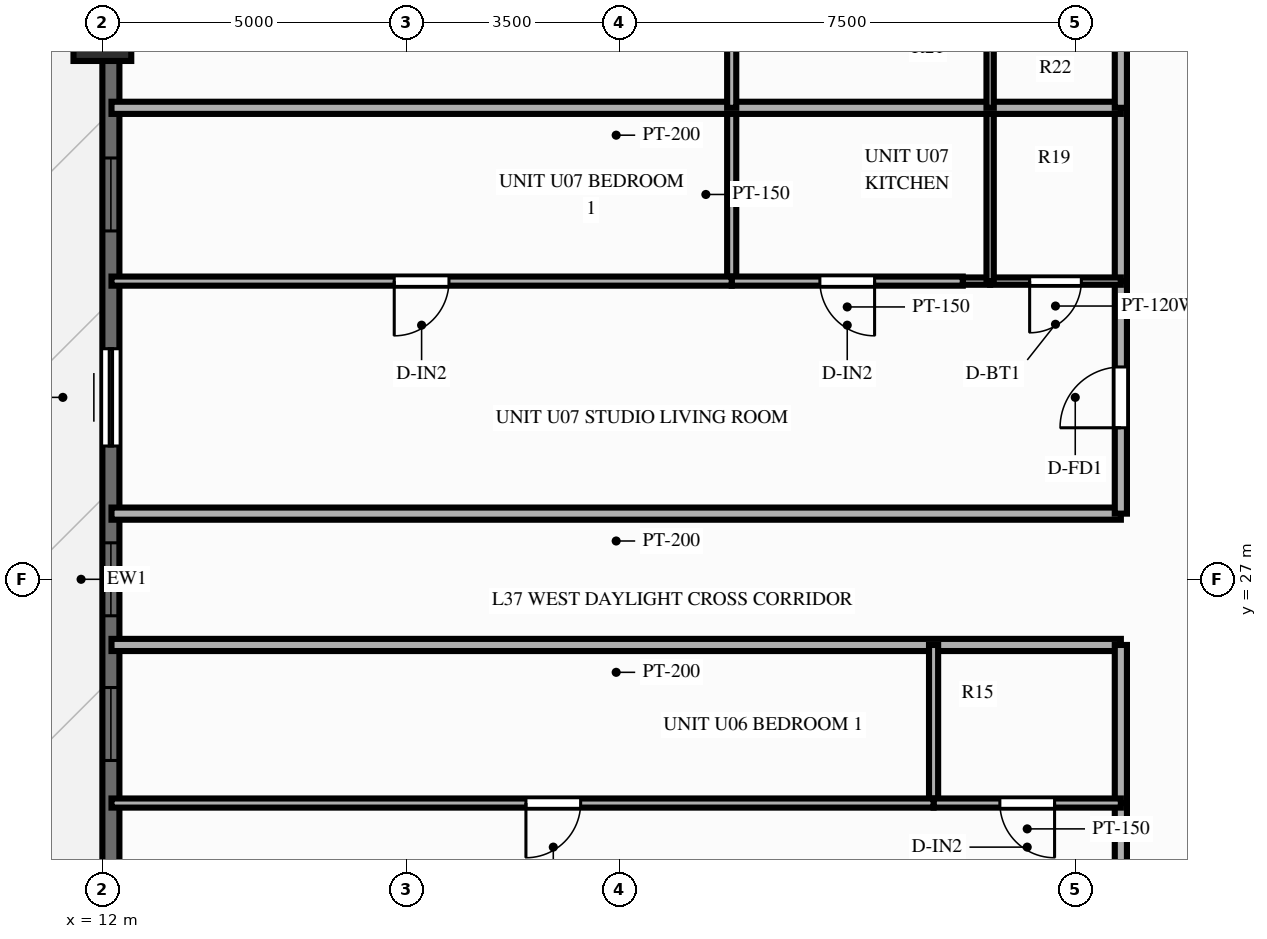
"""IFC4 building model, lengths in metres.
Left out: names, types, materials, properties, quantities, classifications, styles, units other than length and angle.
Written with IfcOpenShell. Run it as: python <this file> out.ifc"""

import sys

from ifc_helpers import new_model, si_unit, direction, frame, frame_2d, origin, origin_2d, place, context, subcontext, project, spatial, rectangle, extrude, source, transform, mapped, element, fill, save


model = new_model("IFC4")
c1 = context("Model", 3, precision=1e-05, world=origin(), true_north=direction((0.0, 1.0)))
c2 = subcontext(c1, "Body", "Model", "MODEL_VIEW")
j1 = project(units=[si_unit("LENGTHUNIT", "METRE"), si_unit("PLANEANGLEUNIT", "RADIAN")], contexts=[c1])
p1 = place(None, origin())
s1 = spatial("IfcSite", under=j1, at=p1, CompositionType="ELEMENT")
p2 = place(p1, origin())
s2 = spatial("IfcBuilding", under=s1, at=p2, CompositionType="ELEMENT")
p3 = place(p2, frame((0.0, 0.0, 116.85)))
s3 = spatial("IfcBuildingStorey", under=s2, at=p3, CompositionType="ELEMENT", Elevation=116.85)
m1 = source(origin(), c2, "Body", "SweptSolid", [
    extrude(rectangle(XDim=0.95, YDim=0.95, at=origin_2d()), origin(), (0.0, 0.0, 1.0), 3.0),
])
p4 = place(p3, frame((12.0, 36.0, 0.0), z_axis=(0.0, 0.0, 1.0), x_axis=(1.0, 0.0, 0.0)))
e1 = element("IfcColumn", 1, at=p4, inside=s3, PredefinedType="COLUMN", context=c2, shape_type="MappedRepresentation", body=[
    mapped(m1, transform((0.0, 0.0, 0.0), scale=1.0)),
])
p5 = place(p3, frame((12.14, 7.2, 0.0), z_axis=(0.0, 0.0, 1.0), x_axis=(0.0, 1.0, 0.0)))
e2 = element("IfcWall", 2, at=p5, inside=s3, PredefinedType="SOLIDWALL", context=c2, shape_type="SweptSolid", body=[
    extrude(rectangle(XDim=39.6, YDim=0.28, at=frame_2d((19.8, 0.0))), origin(), (0.0, 0.0, 1.0), 2.28),
])
p6 = place(p5, frame((0.945, 0.0, 0.25)))
e3 = element("IfcOpeningElement", 3, at=p6, cuts=e2, PredefinedType="OPENING", context=c2, shape_type="SweptSolid", body=[
    extrude(rectangle(XDim=1.2, YDim=1.5, at=frame_2d((0.6, 0.75))), frame((0.0, 0.152, 0.0), z_axis=(0.0, -1.0, 0.0), x_axis=(1.0, 0.0, 0.0)), (0.0, 0.0, 1.0), 0.304),
])
p7 = place(p5, frame((4.213, 0.0, 0.25)))
e4 = element("IfcOpeningElement", 4, at=p7, cuts=e2, PredefinedType="OPENING", context=c2, shape_type="SweptSolid", body=[
    extrude(rectangle(XDim=1.2, YDim=1.5, at=frame_2d((0.6, 0.75))), frame((0.0, 0.152, 0.0), z_axis=(0.0, -1.0, 0.0), x_axis=(1.0, 0.0, 0.0)), (0.0, 0.0, 1.0), 0.304),
])
p8 = place(p5, frame((7.55, 0.0, 0.25)))
e5 = element("IfcOpeningElement", 5, at=p8, cuts=e2, PredefinedType="OPENING", context=c2, shape_type="SweptSolid", body=[
    extrude(rectangle(XDim=1.2, YDim=1.5, at=frame_2d((0.6, 0.75))), frame((0.0, 0.152, 0.0), z_axis=(0.0, -1.0, 0.0), x_axis=(1.0, 0.0, 0.0)), (0.0, 0.0, 1.0), 0.304),
])
p9 = place(p5, frame((13.483, 0.0, 0.25)))
e6 = element("IfcOpeningElement", 6, at=p9, cuts=e2, PredefinedType="OPENING", context=c2, shape_type="SweptSolid", body=[
    extrude(rectangle(XDim=1.2, YDim=1.5, at=frame_2d((0.6, 0.75))), frame((0.0, 0.152, 0.0), z_axis=(0.0, -1.0, 0.0), x_axis=(1.0, 0.0, 0.0)), (0.0, 0.0, 1.0), 0.304),
])
p10 = place(p5, frame((16.82, 0.0, 0.25)))
e7 = element("IfcOpeningElement", 7, at=p10, cuts=e2, PredefinedType="OPENING", context=c2, shape_type="SweptSolid", body=[
    extrude(rectangle(XDim=1.2, YDim=1.5, at=frame_2d((0.6, 0.75))), frame((0.0, 0.152, 0.0), z_axis=(0.0, -1.0, 0.0), x_axis=(1.0, 0.0, 0.0)), (0.0, 0.0, 1.0), 0.304),
])
p11 = place(p5, frame((19.2, 0.0, 0.25)))
e8 = element("IfcOpeningElement", 8, at=p11, cuts=e2, PredefinedType="OPENING", context=c2, shape_type="SweptSolid", body=[
    extrude(rectangle(XDim=1.2, YDim=1.5, at=frame_2d((0.6, 0.75))), frame((0.0, 0.152, 0.0), z_axis=(0.0, -1.0, 0.0), x_axis=(1.0, 0.0, 0.0)), (0.0, 0.0, 1.0), 0.304),
])
p12 = place(p5, frame((21.992, 0.0, 0.0)))
e9 = element("IfcOpeningElement", 9, at=p12, cuts=e2, PredefinedType="OPENING", context=c2, shape_type="SweptSolid", body=[
    extrude(rectangle(XDim=1.6, YDim=2.15, at=frame_2d((0.8, 1.075))), frame((0.0, 0.152, 0.0), z_axis=(0.0, -1.0, 0.0), x_axis=(1.0, 0.0, 0.0)), (0.0, 0.0, 1.0), 0.304),
])
p13 = place(p5, frame((25.529, 0.0, 0.25)))
e10 = element("IfcOpeningElement", 10, at=p13, cuts=e2, PredefinedType="OPENING", context=c2, shape_type="SweptSolid", body=[
    extrude(rectangle(XDim=1.2, YDim=1.5, at=frame_2d((0.6, 0.75))), frame((0.0, 0.152, 0.0), z_axis=(0.0, -1.0, 0.0), x_axis=(1.0, 0.0, 0.0)), (0.0, 0.0, 1.0), 0.304),
])
p14 = place(p5, frame((29.349, 0.0, 0.25)))
e11 = element("IfcOpeningElement", 11, at=p14, cuts=e2, PredefinedType="OPENING", context=c2, shape_type="SweptSolid", body=[
    extrude(rectangle(XDim=0.7, YDim=1.5, at=frame_2d((0.35, 0.75))), frame((0.0, 0.152, 0.0), z_axis=(0.0, -1.0, 0.0), x_axis=(1.0, 0.0, 0.0)), (0.0, 0.0, 1.0), 0.304),
])
p15 = place(p5, frame((31.285, 0.0, 0.25)))
e12 = element("IfcOpeningElement", 12, at=p15, cuts=e2, PredefinedType="OPENING", context=c2, shape_type="SweptSolid", body=[
    extrude(rectangle(XDim=1.2, YDim=1.5, at=frame_2d((0.6, 0.75))), frame((0.0, 0.152, 0.0), z_axis=(0.0, -1.0, 0.0), x_axis=(1.0, 0.0, 0.0)), (0.0, 0.0, 1.0), 0.304),
])
p16 = place(p5, frame((34.252, 0.0, 0.25)))
e13 = element("IfcOpeningElement", 13, at=p16, cuts=e2, PredefinedType="OPENING", context=c2, shape_type="SweptSolid", body=[
    extrude(rectangle(XDim=1.2, YDim=1.5, at=frame_2d((0.6, 0.75))), frame((0.0, 0.152, 0.0), z_axis=(0.0, -1.0, 0.0), x_axis=(1.0, 0.0, 0.0)), (0.0, 0.0, 1.0), 0.304),
])
p17 = place(p5, frame((37.151, 0.0, 0.25)))
e14 = element("IfcOpeningElement", 14, at=p17, cuts=e2, PredefinedType="OPENING", context=c2, shape_type="SweptSolid", body=[
    extrude(rectangle(XDim=1.2, YDim=1.5, at=frame_2d((0.6, 0.75))), frame((0.0, 0.152, 0.0), z_axis=(0.0, -1.0, 0.0), x_axis=(1.0, 0.0, 0.0)), (0.0, 0.0, 1.0), 0.304),
])
p18 = place(p3, frame((28.75, 25.92, 0.0), z_axis=(0.0, 0.0, 1.0), x_axis=(-1.0, 0.0, 0.0)))
e15 = element("IfcWall", 15, at=p18, inside=s3, PredefinedType="PARTITIONING", context=c2, shape_type="SweptSolid", body=[
    extrude(rectangle(XDim=16.6, YDim=0.2, at=frame_2d((8.3, 0.0))), origin(), (0.0, 0.0, 1.0), 2.79),
])
p19 = place(p3, frame((28.75, 19.246, 0.0), z_axis=(0.0, 0.0, 1.0), x_axis=(0.0, 1.0, 0.0)))
e16 = element("IfcWall", 16, at=p19, inside=s3, PredefinedType="PARTITIONING", context=c2, shape_type="SweptSolid", body=[
    extrude(rectangle(XDim=4.074, YDim=0.2, at=frame_2d((2.037, 0.0))), origin(), (0.0, 0.0, 1.0), 2.79),
])
p20 = place(p19, frame((1.537, 0.0, 0.0)))
e17 = element("IfcOpeningElement", 17, at=p20, cuts=e16, PredefinedType="OPENING", context=c2, shape_type="SweptSolid", body=[
    extrude(rectangle(XDim=1.0, YDim=2.15, at=frame_2d((0.5, 1.075))), frame((0.0, 0.112, 0.0), z_axis=(0.0, -1.0, 0.0), x_axis=(1.0, 0.0, 0.0)), (0.0, 0.0, 1.0), 0.224),
])
p21 = place(p3, frame((28.75, 23.32, 0.0), z_axis=(0.0, 0.0, 1.0), x_axis=(0.0, 1.0, 0.0)))
e18 = element("IfcWall", 18, at=p21, inside=s3, PredefinedType="PARTITIONING", context=c2, shape_type="SweptSolid", body=[
    extrude(rectangle(XDim=2.6, YDim=0.2, at=frame_2d((1.3, 0.0))), origin(), (0.0, 0.0, 1.0), 2.79),
])
p22 = place(p3, frame((25.67, 23.32, 0.0), z_axis=(0.0, 0.0, 1.0), x_axis=(0.0, 1.0, 0.0)))
e19 = element("IfcWall", 19, at=p22, inside=s3, PredefinedType="PARTITIONING", context=c2, shape_type="SweptSolid", body=[
    extrude(rectangle(XDim=2.6, YDim=0.15, at=frame_2d((1.3, 0.0))), origin(), (0.0, 0.0, 1.0), 2.79),
])
p23 = place(p3, frame((28.75, 23.32, 0.0), z_axis=(0.0, 0.0, 1.0), x_axis=(-1.0, 0.0, 0.0)))
e20 = element("IfcWall", 20, at=p23, inside=s3, PredefinedType="PARTITIONING", context=c2, shape_type="SweptSolid", body=[
    extrude(rectangle(XDim=3.08, YDim=0.15, at=frame_2d((1.54, 0.0))), origin(), (0.0, 0.0, 1.0), 2.79),
])
p24 = place(p23, frame((1.09, 0.0, 0.0)))
e21 = element("IfcOpeningElement", 21, at=p24, cuts=e20, PredefinedType="OPENING", context=c2, shape_type="SweptSolid", body=[
    extrude(rectangle(XDim=0.9, YDim=2.1, at=frame_2d((0.45, 1.05))), frame((0.0, 0.087, 0.0), z_axis=(0.0, -1.0, 0.0), x_axis=(1.0, 0.0, 0.0)), (0.0, 0.0, 1.0), 0.174),
])
p25 = place(p3, frame((25.67, 23.32, 0.0), z_axis=(0.0, 0.0, 1.0), x_axis=(-1.0, 0.0, 0.0)))
e22 = element("IfcWall", 22, at=p25, inside=s3, PredefinedType="PARTITIONING", context=c2, shape_type="SweptSolid", body=[
    extrude(rectangle(XDim=13.52, YDim=0.15, at=frame_2d((6.76, 0.0))), origin(), (0.0, 0.0, 1.0), 2.79),
])
p26 = place(p25, frame((5.804, 0.0, 0.0)))
e23 = element("IfcOpeningElement", 23, at=p26, cuts=e22, PredefinedType="OPENING", context=c2, shape_type="SweptSolid", body=[
    extrude(rectangle(XDim=0.9, YDim=2.1, at=frame_2d((0.45, 1.05))), frame((0.0, 0.087, 0.0), z_axis=(0.0, -1.0, 0.0), x_axis=(1.0, 0.0, 0.0)), (0.0, 0.0, 1.0), 0.174),
])
p27 = place(p3, frame((28.75, 28.08, 0.0), z_axis=(0.0, 0.0, 1.0), x_axis=(-1.0, 0.0, 0.0)))
e24 = element("IfcWall", 24, at=p27, inside=s3, PredefinedType="PARTITIONING", context=c2, shape_type="SweptSolid", body=[
    extrude(rectangle(XDim=16.6, YDim=0.2, at=frame_2d((8.3, 0.0))), origin(), (0.0, 0.0, 1.0), 2.79),
])
p28 = place(p3, frame((28.75, 28.08, 0.0), z_axis=(0.0, 0.0, 1.0), x_axis=(0.0, 1.0, 0.0)))
e25 = element("IfcWall", 25, at=p28, inside=s3, PredefinedType="PARTITIONING", context=c2, shape_type="SweptSolid", body=[
    extrude(rectangle(XDim=3.824, YDim=0.2, at=frame_2d((1.912, 0.0))), origin(), (0.0, 0.0, 1.0), 2.79),
])
p29 = place(p28, frame((1.412, 0.0, 0.0)))
e26 = element("IfcOpeningElement", 26, at=p29, cuts=e25, PredefinedType="OPENING", context=c2, shape_type="SweptSolid", body=[
    extrude(rectangle(XDim=1.0, YDim=2.15, at=frame_2d((0.5, 1.075))), frame((0.0, 0.112, 0.0), z_axis=(0.0, -1.0, 0.0), x_axis=(1.0, 0.0, 0.0)), (0.0, 0.0, 1.0), 0.224),
])
p30 = place(p3, frame((28.75, 31.904, 0.0), z_axis=(0.0, 0.0, 1.0), x_axis=(0.0, 1.0, 0.0)))
e27 = element("IfcWall", 27, at=p30, inside=s3, PredefinedType="PARTITIONING", context=c2, shape_type="SweptSolid", body=[
    extrude(rectangle(XDim=2.85, YDim=0.2, at=frame_2d((1.425, 0.0))), origin(), (0.0, 0.0, 1.0), 2.79),
])
p31 = place(p3, frame((28.75, 31.904, 0.0), z_axis=(0.0, 0.0, 1.0), x_axis=(-1.0, 0.0, 0.0)))
e28 = element("IfcWall", 28, at=p31, inside=s3, PredefinedType="PARTITIONING", context=c2, shape_type="SweptSolid", body=[
    extrude(rectangle(XDim=2.15, YDim=0.12, at=frame_2d((1.075, 0.0))), origin(), (0.0, 0.0, 1.0), 2.79),
])
p32 = place(p31, frame((0.65, 0.0, 0.0)))
e29 = element("IfcOpeningElement", 29, at=p32, cuts=e28, PredefinedType="OPENING", context=c2, shape_type="SweptSolid", body=[
    extrude(rectangle(XDim=0.85, YDim=2.05, at=frame_2d((0.425, 1.025))), frame((0.0, 0.072, 0.0), z_axis=(0.0, -1.0, 0.0), x_axis=(1.0, 0.0, 0.0)), (0.0, 0.0, 1.0), 0.144),
])
p33 = place(p3, frame((26.6, 31.904, 0.0), z_axis=(0.0, 0.0, 1.0), x_axis=(-1.0, 0.0, 0.0)))
e30 = element("IfcWall", 30, at=p33, inside=s3, PredefinedType="PARTITIONING", context=c2, shape_type="SweptSolid", body=[
    extrude(rectangle(XDim=0.45, YDim=0.12, at=frame_2d((0.225, 0.0))), origin(), (0.0, 0.0, 1.0), 2.79),
])
p34 = place(p3, frame((26.6, 31.904, 0.0), z_axis=(0.0, 0.0, 1.0), x_axis=(0.0, 1.0, 0.0)))
e31 = element("IfcWall", 31, at=p34, inside=s3, PredefinedType="PARTITIONING", context=c2, shape_type="SweptSolid", body=[
    extrude(rectangle(XDim=2.85, YDim=0.12, at=frame_2d((1.425, 0.0))), origin(), (0.0, 0.0, 1.0), 2.79),
])
p35 = place(p3, frame((22.35, 31.904, 0.0), z_axis=(0.0, 0.0, 1.0), x_axis=(0.0, 1.0, 0.0)))
e32 = element("IfcWall", 32, at=p35, inside=s3, PredefinedType="PARTITIONING", context=c2, shape_type="SweptSolid", body=[
    extrude(rectangle(XDim=2.85, YDim=0.15, at=frame_2d((1.425, 0.0))), origin(), (0.0, 0.0, 1.0), 2.79),
])
p36 = place(p3, frame((26.15, 31.904, 0.0), z_axis=(0.0, 0.0, 1.0), x_axis=(-1.0, 0.0, 0.0)))
e33 = element("IfcWall", 33, at=p36, inside=s3, PredefinedType="PARTITIONING", context=c2, shape_type="SweptSolid", body=[
    extrude(rectangle(XDim=3.8, YDim=0.15, at=frame_2d((1.9, 0.0))), origin(), (0.0, 0.0, 1.0), 2.79),
])
p37 = place(p36, frame((1.45, 0.0, 0.0)))
e34 = element("IfcOpeningElement", 34, at=p37, cuts=e33, PredefinedType="OPENING", context=c2, shape_type="SweptSolid", body=[
    extrude(rectangle(XDim=0.9, YDim=2.1, at=frame_2d((0.45, 1.05))), frame((0.0, 0.087, 0.0), z_axis=(0.0, -1.0, 0.0), x_axis=(1.0, 0.0, 0.0)), (0.0, 0.0, 1.0), 0.174),
])
p38 = place(p3, frame((22.35, 31.904, 0.0), z_axis=(0.0, 0.0, 1.0), x_axis=(-1.0, 0.0, 0.0)))
e35 = element("IfcWall", 35, at=p38, inside=s3, PredefinedType="PARTITIONING", context=c2, shape_type="SweptSolid", body=[
    extrude(rectangle(XDim=10.2, YDim=0.15, at=frame_2d((5.1, 0.0))), origin(), (0.0, 0.0, 1.0), 2.79),
])
p39 = place(p38, frame((4.65, 0.0, 0.0)))
e36 = element("IfcOpeningElement", 36, at=p39, cuts=e35, PredefinedType="OPENING", context=c2, shape_type="SweptSolid", body=[
    extrude(rectangle(XDim=0.9, YDim=2.1, at=frame_2d((0.45, 1.05))), frame((0.0, 0.087, 0.0), z_axis=(0.0, -1.0, 0.0), x_axis=(1.0, 0.0, 0.0)), (0.0, 0.0, 1.0), 0.174),
])
p40 = place(p3, frame((28.75, 34.754, 0.0), z_axis=(0.0, 0.0, 1.0), x_axis=(-1.0, 0.0, 0.0)))
e37 = element("IfcWall", 37, at=p40, inside=s3, PredefinedType="PARTITIONING", context=c2, shape_type="SweptSolid", body=[
    extrude(rectangle(XDim=16.6, YDim=0.2, at=frame_2d((8.3, 0.0))), origin(), (0.0, 0.0, 1.0), 2.79),
])
p41 = place(p3, frame((28.75, 34.754, 0.0), z_axis=(0.0, 0.0, 1.0), x_axis=(0.0, 1.0, 0.0)))
e38 = element("IfcWall", 38, at=p41, inside=s3, PredefinedType="PARTITIONING", context=c2, shape_type="SweptSolid", body=[
    extrude(rectangle(XDim=2.729, YDim=0.2, at=frame_2d((1.365, 0.0))), origin(), (0.0, 0.0, 1.0), 2.79),
])
p42 = place(p3, frame((26.6, 34.754, 0.0), z_axis=(0.0, 0.0, 1.0), x_axis=(0.0, 1.0, 0.0)))
e39 = element("IfcWall", 39, at=p42, inside=s3, PredefinedType="PARTITIONING", context=c2, shape_type="SweptSolid", body=[
    extrude(rectangle(XDim=2.729, YDim=0.12, at=frame_2d((1.365, 0.0))), origin(), (0.0, 0.0, 1.0), 2.79),
])
p43 = place(p3, frame((22.35, 34.754, 0.0), z_axis=(0.0, 0.0, 1.0), x_axis=(0.0, 1.0, 0.0)))
e40 = element("IfcWall", 40, at=p43, inside=s3, PredefinedType="PARTITIONING", context=c2, shape_type="SweptSolid", body=[
    extrude(rectangle(XDim=2.729, YDim=0.15, at=frame_2d((1.365, 0.0))), origin(), (0.0, 0.0, 1.0), 2.79),
])
m2 = source(origin(), c2, "Body", "SweptSolid", [
    extrude(rectangle(XDim=1.2, YDim=1.5, at=frame_2d((0.6, 0.75))), frame((0.0, 0.03, 0.0), z_axis=(0.0, -1.0, 0.0), x_axis=(1.0, 0.0, 0.0)), (0.0, 0.0, 1.0), 0.06),
])
p44 = place(p10, origin())
e41 = element("IfcWindow", 41, at=p44, inside=s3, PartitioningType="SINGLE_PANEL", PredefinedType="WINDOW", context=c2, shape_type="MappedRepresentation", body=[
    mapped(m2, transform((0.0, 0.0, 0.0), scale=1.0)),
])
fill(e7, e41)
p45 = place(p11, origin())
e42 = element("IfcWindow", 42, at=p45, inside=s3, PartitioningType="SINGLE_PANEL", PredefinedType="WINDOW", context=c2, shape_type="MappedRepresentation", body=[
    mapped(m2, transform((0.0, 0.0, 0.0), scale=1.0)),
])
fill(e8, e42)
m3 = source(origin(), c2, "Body", "SweptSolid", [
    extrude(rectangle(XDim=1.6, YDim=2.15, at=frame_2d((0.8, 1.075))), frame((0.0, 0.025, 0.0), z_axis=(0.0, -1.0, 0.0), x_axis=(1.0, 0.0, 0.0)), (0.0, 0.0, 1.0), 0.05),
])
p46 = place(p12, origin())
e43 = element("IfcDoor", 43, at=p46, inside=s3, OperationType="SLIDING_TO_LEFT", PredefinedType="DOOR", context=c2, shape_type="MappedRepresentation", body=[
    mapped(m3, transform((0.0, 0.0, 0.0), scale=1.0)),
])
fill(e9, e43)
p47 = place(p13, origin())
e44 = element("IfcWindow", 44, at=p47, inside=s3, PartitioningType="SINGLE_PANEL", PredefinedType="WINDOW", context=c2, shape_type="MappedRepresentation", body=[
    mapped(m2, transform((0.0, 0.0, 0.0), scale=1.0)),
])
fill(e10, e44)
m4 = source(origin(), c2, "Body", "SweptSolid", [
    extrude(rectangle(XDim=0.9, YDim=2.1, at=frame_2d((0.45, 1.05))), frame((0.0, 0.025, 0.0), z_axis=(0.0, -1.0, 0.0), x_axis=(1.0, 0.0, 0.0)), (0.0, 0.0, 1.0), 0.05),
])
p48 = place(p24, origin())
e45 = element("IfcDoor", 45, at=p48, inside=s3, OperationType="SINGLE_SWING_LEFT", PredefinedType="DOOR", context=c2, shape_type="MappedRepresentation", body=[
    mapped(m4, transform((0.0, 0.0, 0.0), scale=1.0)),
])
fill(e21, e45)
p49 = place(p26, origin())
e46 = element("IfcDoor", 46, at=p49, inside=s3, OperationType="SINGLE_SWING_RIGHT", PredefinedType="DOOR", context=c2, shape_type="MappedRepresentation", body=[
    mapped(m4, transform((0.0, 0.0, 0.0), scale=1.0)),
])
fill(e23, e46)
m5 = source(origin(), c2, "Body", "SweptSolid", [
    extrude(rectangle(XDim=1.0, YDim=2.15, at=frame_2d((0.5, 1.075))), frame((0.0, 0.025, 0.0), z_axis=(0.0, -1.0, 0.0), x_axis=(1.0, 0.0, 0.0)), (0.0, 0.0, 1.0), 0.05),
])
p50 = place(p29, origin())
e47 = element("IfcDoor", 47, at=p50, inside=s3, OperationType="SINGLE_SWING_LEFT", PredefinedType="DOOR", context=c2, shape_type="MappedRepresentation", body=[
    mapped(m5, transform((0.0, 0.0, 0.0), scale=1.0)),
])
fill(e26, e47)
m6 = source(origin(), c2, "Body", "SweptSolid", [
    extrude(rectangle(XDim=0.85, YDim=2.05, at=frame_2d((0.425, 1.025))), frame((0.0, 0.025, 0.0), z_axis=(0.0, -1.0, 0.0), x_axis=(1.0, 0.0, 0.0)), (0.0, 0.0, 1.0), 0.05),
])
p51 = place(p32, origin())
e48 = element("IfcDoor", 48, at=p51, inside=s3, OperationType="SINGLE_SWING_RIGHT", PredefinedType="DOOR", context=c2, shape_type="MappedRepresentation", body=[
    mapped(m6, transform((0.0, 0.0, 0.0), scale=1.0)),
])
fill(e29, e48)
p52 = place(p37, origin())
e49 = element("IfcDoor", 49, at=p52, inside=s3, OperationType="SINGLE_SWING_LEFT", PredefinedType="DOOR", context=c2, shape_type="MappedRepresentation", body=[
    mapped(m4, transform((0.0, 0.0, 0.0), scale=1.0)),
])
fill(e34, e49)
p53 = place(p39, origin())
e50 = element("IfcDoor", 50, at=p53, inside=s3, OperationType="SINGLE_SWING_RIGHT", PredefinedType="DOOR", context=c2, shape_type="MappedRepresentation", body=[
    mapped(m4, transform((0.0, 0.0, 0.0), scale=1.0)),
])
fill(e36, e50)
save(model, sys.argv[1])
